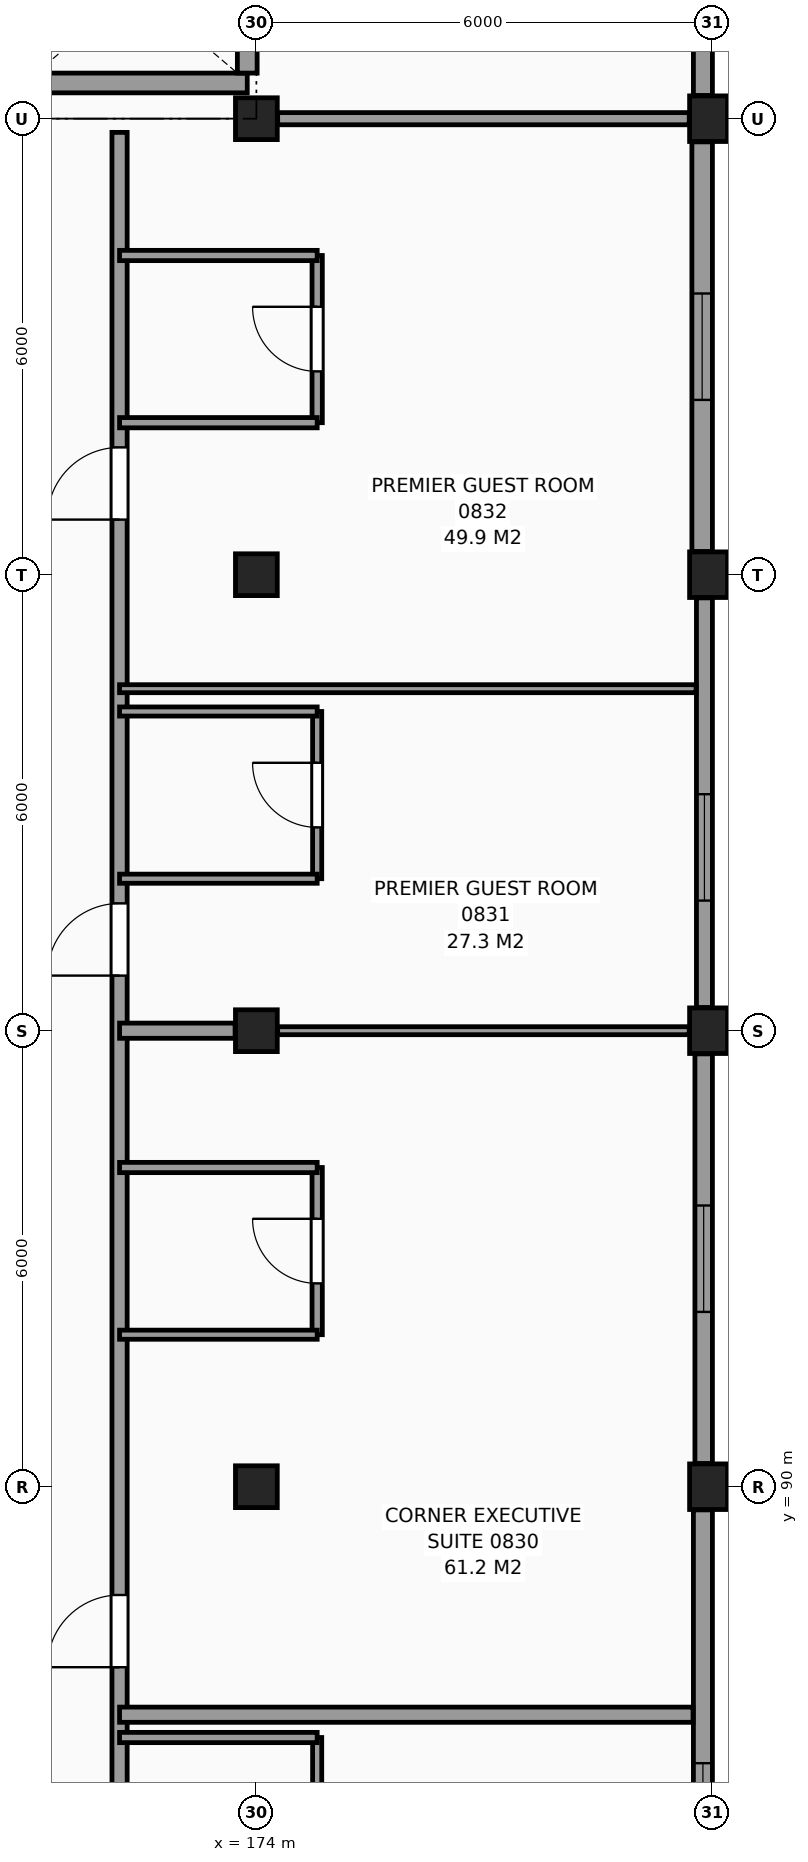
"""IFC4 building model, lengths in metres.
Left out: names, types, materials, properties, quantities, classifications, styles, units other than length and angle.
Written with IfcOpenShell. Run it as: python <this file> out.ifc"""

import sys

from ifc_helpers import new_model, si_unit, direction, frame, frame_2d, origin, origin_2d, place, context, subcontext, project, spatial, rectangle, extrude, element, fill, save


model = new_model("IFC4")
c1 = context("Model", 3, precision=1e-05, world=origin(), true_north=direction((0.0, 1.0)))
c2 = subcontext(c1, "Body", "Model", "MODEL_VIEW")
j1 = project(units=[si_unit("LENGTHUNIT", "METRE"), si_unit("PLANEANGLEUNIT", "RADIAN")], contexts=[c1])
p1 = place(None, origin())
s1 = spatial("IfcSite", under=j1, at=p1, CompositionType="ELEMENT")
p2 = place(p1, origin())
s2 = spatial("IfcBuilding", under=s1, at=p2, CompositionType="ELEMENT")
p3 = place(p2, frame((0.0, 0.0, 34.8)))
s3 = spatial("IfcBuildingStorey", under=s2, at=p3, CompositionType="ELEMENT", Elevation=34.8)
for number, where, z_axis, x_axis in (
    (1, (174.0, 90.0, 0.0), (0.0, 0.0, 1.0), (1.0, 0.0, 0.0)),
    (2, (174.0, 96.0, 0.0), (0.0, 0.0, 1.0), (1.0, 0.0, 0.0)),
    (3, (174.0, 102.0, 0.0), (0.0, 0.0, 1.0), (1.0, 0.0, 0.0)),
    (4, (174.0, 108.0, 0.0), (0.0, 0.0, 1.0), (1.0, 0.0, 0.0)),
):
    element("IfcColumn", number, at=place(p3, frame(where, z_axis=z_axis, x_axis=x_axis)), inside=s3, PredefinedType="COLUMN", context=c2, shape_type="SweptSolid", body=[
        extrude(rectangle(XDim=0.55, YDim=0.55, at=origin_2d()), origin(), (0.0, 0.0, 1.0), 3.3),
    ])
for number, where, z_axis, x_axis in (
    (5, (180.0, 90.0, 0.0), (0.0, 0.0, 1.0), (1.0, 0.0, 0.0)),
    (6, (180.0, 96.0, 0.0), (0.0, 0.0, 1.0), (1.0, 0.0, 0.0)),
    (7, (180.0, 102.0, 0.0), (0.0, 0.0, 1.0), (1.0, 0.0, 0.0)),
    (8, (180.0, 108.0, 0.0), (0.0, 0.0, 1.0), (1.0, 0.0, 0.0)),
):
    element("IfcColumn", number, at=place(p3, frame(where, z_axis=z_axis, x_axis=x_axis)), inside=s3, PredefinedType="COLUMN", context=c2, shape_type="SweptSolid", body=[
        extrude(rectangle(XDim=0.6, YDim=0.6, at=origin_2d()), origin(), (0.0, 0.0, 1.0), 3.3),
    ])
p4 = place(p3, frame((179.875, 84.305, 0.0), z_axis=(0.0, 0.0, 1.0), x_axis=(0.0, 1.0, 0.0)))
e9 = element("IfcWall", 9, at=p4, inside=s3, PredefinedType="SOLIDWALL", context=c2, shape_type="SweptSolid", body=[
    extrude(rectangle(XDim=5.39, YDim=0.25, at=frame_2d((2.695, 0.0))), origin(), (0.0, 0.0, 1.0), 2.42),
])
p5 = place(p4, frame((0.657, 0.0, 0.8)))
e10 = element("IfcOpeningElement", 10, at=p5, cuts=e9, PredefinedType="OPENING", context=c2, shape_type="SweptSolid", body=[
    extrude(rectangle(XDim=1.4, YDim=1.4, at=frame_2d((0.7, 0.7))), frame((0.0, 0.135, 0.0), z_axis=(0.0, -1.0, 0.0), x_axis=(1.0, 0.0, 0.0)), (0.0, 0.0, 1.0), 0.27),
])
p6 = place(p3, frame((179.885, 90.305, 0.0), z_axis=(0.0, 0.0, 1.0), x_axis=(0.0, 1.0, 0.0)))
e11 = element("IfcWall", 11, at=p6, inside=s3, PredefinedType="SOLIDWALL", context=c2, shape_type="SweptSolid", body=[
    extrude(rectangle(XDim=5.39, YDim=0.23, at=frame_2d((2.695, 0.0))), origin(), (0.0, 0.0, 1.0), 2.42),
])
p7 = place(p6, frame((1.995, 0.0, 0.8)))
e12 = element("IfcOpeningElement", 12, at=p7, cuts=e11, PredefinedType="OPENING", context=c2, shape_type="SweptSolid", body=[
    extrude(rectangle(XDim=1.4, YDim=1.4, at=frame_2d((0.7, 0.7))), frame((0.0, 0.125, 0.0), z_axis=(0.0, -1.0, 0.0), x_axis=(1.0, 0.0, 0.0)), (0.0, 0.0, 1.0), 0.25),
])
p8 = place(p3, frame((179.895, 96.305, 0.0), z_axis=(0.0, 0.0, 1.0), x_axis=(0.0, 1.0, 0.0)))
e13 = element("IfcWall", 13, at=p8, inside=s3, PredefinedType="SOLIDWALL", context=c2, shape_type="SweptSolid", body=[
    extrude(rectangle(XDim=5.39, YDim=0.21, at=frame_2d((2.695, 0.0))), origin(), (0.0, 0.0, 1.0), 2.42),
])
p9 = place(p8, frame((1.407, 0.0, 0.8)))
e14 = element("IfcOpeningElement", 14, at=p9, cuts=e13, PredefinedType="OPENING", context=c2, shape_type="SweptSolid", body=[
    extrude(rectangle(XDim=1.4, YDim=1.4, at=frame_2d((0.7, 0.7))), frame((0.0, 0.115, 0.0), z_axis=(0.0, -1.0, 0.0), x_axis=(1.0, 0.0, 0.0)), (0.0, 0.0, 1.0), 0.23),
])
p10 = place(p3, frame((179.865, 102.305, 0.0), z_axis=(0.0, 0.0, 1.0), x_axis=(0.0, 1.0, 0.0)))
e15 = element("IfcWall", 15, at=p10, inside=s3, PredefinedType="SOLIDWALL", context=c2, shape_type="SweptSolid", body=[
    extrude(rectangle(XDim=5.39, YDim=0.27, at=frame_2d((2.695, 0.0))), origin(), (0.0, 0.0, 1.0), 2.42),
])
p11 = place(p10, frame((1.995, 0.0, 0.8)))
e16 = element("IfcOpeningElement", 16, at=p11, cuts=e15, PredefinedType="OPENING", context=c2, shape_type="SweptSolid", body=[
    extrude(rectangle(XDim=1.4, YDim=1.4, at=frame_2d((0.7, 0.7))), frame((0.0, 0.145, 0.0), z_axis=(0.0, -1.0, 0.0), x_axis=(1.0, 0.0, 0.0)), (0.0, 0.0, 1.0), 0.29),
])
p12 = place(p3, frame((179.875, 108.305, 0.0), z_axis=(0.0, 0.0, 1.0), x_axis=(0.0, 1.0, 0.0)))
e17 = element("IfcWall", 17, at=p12, inside=s3, PredefinedType="SOLIDWALL", context=c2, shape_type="SweptSolid", body=[
    extrude(rectangle(XDim=5.39, YDim=0.25, at=frame_2d((2.695, 0.0))), origin(), (0.0, 0.0, 1.0), 2.42),
])
p13 = place(p3, frame((170.97, 108.47, 0.0), z_axis=(0.0, 0.0, 1.0), x_axis=(1.0, 0.0, 0.0)))
e18 = element("IfcWall", 18, at=p13, inside=s3, PredefinedType="SHEAR", context=c2, shape_type="SweptSolid", body=[
    extrude(rectangle(XDim=2.91, YDim=0.26, at=frame_2d((1.455, 0.0))), origin(), (0.0, 0.0, 1.0), 3.3),
])
p14 = place(p3, frame((173.88, 108.6, 0.0), z_axis=(0.0, 0.0, 1.0), x_axis=(0.0, 1.0, 0.0)))
e19 = element("IfcWall", 19, at=p14, inside=s3, PredefinedType="SHEAR", context=c2, shape_type="SweptSolid", body=[
    extrude(rectangle(XDim=2.25, YDim=0.26, at=frame_2d((1.125, 0.0))), origin(), (0.0, 0.0, 1.0), 3.3),
])
p15 = place(p3, frame((172.2, 42.235, 0.0), z_axis=(0.0, 0.0, 1.0), x_axis=(0.0, 1.0, 0.0)))
e20 = element("IfcWall", 20, at=p15, inside=s3, PredefinedType="PARTITIONING", context=c2, shape_type="SweptSolid", body=[
    extrude(rectangle(XDim=65.585, YDim=0.2, at=frame_2d((32.792, 0.0))), origin(), (0.0, 0.0, 1.0), 3.07),
])
p16 = place(p15, frame((7.59, 0.0, 0.0)))
e21 = element("IfcOpeningElement", 21, at=p16, cuts=e20, PredefinedType="OPENING", context=c2, shape_type="SweptSolid", body=[
    extrude(rectangle(XDim=0.95, YDim=2.1, at=frame_2d((0.475, 1.05))), frame((0.0, 0.11, 0.0), z_axis=(0.0, -1.0, 0.0), x_axis=(1.0, 0.0, 0.0)), (0.0, 0.0, 1.0), 0.22),
])
p17 = place(p15, frame((12.09, 0.0, 0.0)))
e22 = element("IfcOpeningElement", 22, at=p17, cuts=e20, PredefinedType="OPENING", context=c2, shape_type="SweptSolid", body=[
    extrude(rectangle(XDim=0.95, YDim=2.1, at=frame_2d((0.475, 1.05))), frame((0.0, 0.11, 0.0), z_axis=(0.0, -1.0, 0.0), x_axis=(1.0, 0.0, 0.0)), (0.0, 0.0, 1.0), 0.22),
])
p18 = place(p15, frame((16.29, 0.0, 0.0)))
e23 = element("IfcOpeningElement", 23, at=p18, cuts=e20, PredefinedType="OPENING", context=c2, shape_type="SweptSolid", body=[
    extrude(rectangle(XDim=0.95, YDim=2.1, at=frame_2d((0.475, 1.05))), frame((0.0, 0.11, 0.0), z_axis=(0.0, -1.0, 0.0), x_axis=(1.0, 0.0, 0.0)), (0.0, 0.0, 1.0), 0.22),
])
p19 = place(p15, frame((18.49, 0.0, 0.0)))
e24 = element("IfcOpeningElement", 24, at=p19, cuts=e20, PredefinedType="OPENING", context=c2, shape_type="SweptSolid", body=[
    extrude(rectangle(XDim=0.95, YDim=2.1, at=frame_2d((0.475, 1.05))), frame((0.0, 0.11, 0.0), z_axis=(0.0, -1.0, 0.0), x_axis=(1.0, 0.0, 0.0)), (0.0, 0.0, 1.0), 0.22),
])
p20 = place(p15, frame((24.49, 0.0, 0.0)))
e25 = element("IfcOpeningElement", 25, at=p20, cuts=e20, PredefinedType="OPENING", context=c2, shape_type="SweptSolid", body=[
    extrude(rectangle(XDim=0.95, YDim=2.1, at=frame_2d((0.475, 1.05))), frame((0.0, 0.11, 0.0), z_axis=(0.0, -1.0, 0.0), x_axis=(1.0, 0.0, 0.0)), (0.0, 0.0, 1.0), 0.22),
])
p21 = place(p15, frame((34.29, 0.0, 0.0)))
e26 = element("IfcOpeningElement", 26, at=p21, cuts=e20, PredefinedType="OPENING", context=c2, shape_type="SweptSolid", body=[
    extrude(rectangle(XDim=0.95, YDim=2.1, at=frame_2d((0.475, 1.05))), frame((0.0, 0.11, 0.0), z_axis=(0.0, -1.0, 0.0), x_axis=(1.0, 0.0, 0.0)), (0.0, 0.0, 1.0), 0.22),
])
p22 = place(p15, frame((36.49, 0.0, 0.0)))
e27 = element("IfcOpeningElement", 27, at=p22, cuts=e20, PredefinedType="OPENING", context=c2, shape_type="SweptSolid", body=[
    extrude(rectangle(XDim=0.95, YDim=2.1, at=frame_2d((0.475, 1.05))), frame((0.0, 0.11, 0.0), z_axis=(0.0, -1.0, 0.0), x_axis=(1.0, 0.0, 0.0)), (0.0, 0.0, 1.0), 0.22),
])
p23 = place(p15, frame((40.89, 0.0, 0.0)))
e28 = element("IfcOpeningElement", 28, at=p23, cuts=e20, PredefinedType="OPENING", context=c2, shape_type="SweptSolid", body=[
    extrude(rectangle(XDim=0.95, YDim=2.1, at=frame_2d((0.475, 1.05))), frame((0.0, 0.11, 0.0), z_axis=(0.0, -1.0, 0.0), x_axis=(1.0, 0.0, 0.0)), (0.0, 0.0, 1.0), 0.22),
])
p24 = place(p15, frame((45.39, 0.0, 0.0)))
e29 = element("IfcOpeningElement", 29, at=p24, cuts=e20, PredefinedType="OPENING", context=c2, shape_type="SweptSolid", body=[
    extrude(rectangle(XDim=0.95, YDim=2.1, at=frame_2d((0.475, 1.05))), frame((0.0, 0.11, 0.0), z_axis=(0.0, -1.0, 0.0), x_axis=(1.0, 0.0, 0.0)), (0.0, 0.0, 1.0), 0.22),
])
p25 = place(p15, frame((54.49, 0.0, 0.0)))
e30 = element("IfcOpeningElement", 30, at=p25, cuts=e20, PredefinedType="OPENING", context=c2, shape_type="SweptSolid", body=[
    extrude(rectangle(XDim=0.95, YDim=2.1, at=frame_2d((0.475, 1.05))), frame((0.0, 0.11, 0.0), z_axis=(0.0, -1.0, 0.0), x_axis=(1.0, 0.0, 0.0)), (0.0, 0.0, 1.0), 0.22),
])
p26 = place(p15, frame((60.49, 0.0, 0.0)))
e31 = element("IfcOpeningElement", 31, at=p26, cuts=e20, PredefinedType="OPENING", context=c2, shape_type="SweptSolid", body=[
    extrude(rectangle(XDim=0.95, YDim=2.1, at=frame_2d((0.475, 1.05))), frame((0.0, 0.11, 0.0), z_axis=(0.0, -1.0, 0.0), x_axis=(1.0, 0.0, 0.0)), (0.0, 0.0, 1.0), 0.22),
])
p27 = place(p3, frame((174.8, 84.5, 0.0), z_axis=(0.0, 0.0, 1.0), x_axis=(0.0, 1.0, 0.0)))
e32 = element("IfcWall", 32, at=p27, inside=s3, PredefinedType="PARTITIONING", context=c2, shape_type="SweptSolid", body=[
    extrude(rectangle(XDim=2.2, YDim=0.12, at=frame_2d((1.1, 0.0))), origin(), (0.0, 0.0, 1.0), 3.07),
])
p28 = place(p27, frame((0.675, 0.0, 0.0)))
e33 = element("IfcOpeningElement", 33, at=p28, cuts=e32, PredefinedType="OPENING", context=c2, shape_type="SweptSolid", body=[
    extrude(rectangle(XDim=0.85, YDim=2.1, at=frame_2d((0.425, 1.05))), frame((0.0, 0.07, 0.0), z_axis=(0.0, -1.0, 0.0), x_axis=(1.0, 0.0, 0.0)), (0.0, 0.0, 1.0), 0.14),
])
p29 = place(p3, frame((174.8, 92.0, 0.0), z_axis=(0.0, 0.0, 1.0), x_axis=(0.0, 1.0, 0.0)))
e34 = element("IfcWall", 34, at=p29, inside=s3, PredefinedType="PARTITIONING", context=c2, shape_type="SweptSolid", body=[
    extrude(rectangle(XDim=2.2, YDim=0.135, at=frame_2d((1.1, 0.0))), origin(), (0.0, 0.0, 1.0), 3.07),
])
p30 = place(p29, frame((0.675, 0.0, 0.0)))
e35 = element("IfcOpeningElement", 35, at=p30, cuts=e34, PredefinedType="OPENING", context=c2, shape_type="SweptSolid", body=[
    extrude(rectangle(XDim=0.85, YDim=2.1, at=frame_2d((0.425, 1.05))), frame((0.0, 0.078, 0.0), z_axis=(0.0, -1.0, 0.0), x_axis=(1.0, 0.0, 0.0)), (0.0, 0.0, 1.0), 0.155),
])
p31 = place(p3, frame((174.8, 98.0, 0.0), z_axis=(0.0, 0.0, 1.0), x_axis=(0.0, 1.0, 0.0)))
e36 = element("IfcWall", 36, at=p31, inside=s3, PredefinedType="PARTITIONING", context=c2, shape_type="SweptSolid", body=[
    extrude(rectangle(XDim=2.2, YDim=0.12, at=frame_2d((1.1, 0.0))), origin(), (0.0, 0.0, 1.0), 3.07),
])
p32 = place(p31, frame((0.675, 0.0, 0.0)))
e37 = element("IfcOpeningElement", 37, at=p32, cuts=e36, PredefinedType="OPENING", context=c2, shape_type="SweptSolid", body=[
    extrude(rectangle(XDim=0.85, YDim=2.1, at=frame_2d((0.425, 1.05))), frame((0.0, 0.07, 0.0), z_axis=(0.0, -1.0, 0.0), x_axis=(1.0, 0.0, 0.0)), (0.0, 0.0, 1.0), 0.14),
])
p33 = place(p3, frame((174.8, 104.0, 0.0), z_axis=(0.0, 0.0, 1.0), x_axis=(0.0, 1.0, 0.0)))
e38 = element("IfcWall", 38, at=p33, inside=s3, PredefinedType="PARTITIONING", context=c2, shape_type="SweptSolid", body=[
    extrude(rectangle(XDim=2.2, YDim=0.135, at=frame_2d((1.1, 0.0))), origin(), (0.0, 0.0, 1.0), 3.07),
])
p34 = place(p33, frame((0.675, 0.0, 0.0)))
e39 = element("IfcOpeningElement", 39, at=p34, cuts=e38, PredefinedType="OPENING", context=c2, shape_type="SweptSolid", body=[
    extrude(rectangle(XDim=0.85, YDim=2.1, at=frame_2d((0.425, 1.05))), frame((0.0, 0.078, 0.0), z_axis=(0.0, -1.0, 0.0), x_axis=(1.0, 0.0, 0.0)), (0.0, 0.0, 1.0), 0.155),
])
p35 = place(p3, frame((172.2, 86.7, 0.0), z_axis=(0.0, 0.0, 1.0), x_axis=(1.0, 0.0, 0.0)))
e40 = element("IfcWall", 40, at=p35, inside=s3, PredefinedType="PARTITIONING", context=c2, shape_type="SweptSolid", body=[
    extrude(rectangle(XDim=2.6, YDim=0.135, at=frame_2d((1.3, 0.0))), origin(), (0.0, 0.0, 1.0), 3.07),
])
p36 = place(p3, frame((172.2, 87.0, 0.0), z_axis=(0.0, 0.0, 1.0), x_axis=(1.0, 0.0, 0.0)))
e41 = element("IfcWall", 41, at=p36, inside=s3, PredefinedType="PARTITIONING", context=c2, shape_type="SweptSolid", body=[
    extrude(rectangle(XDim=7.545, YDim=0.2, at=frame_2d((3.772, 0.0))), origin(), (0.0, 0.0, 1.0), 3.07),
])
p37 = place(p3, frame((172.2, 92.0, 0.0), z_axis=(0.0, 0.0, 1.0), x_axis=(1.0, 0.0, 0.0)))
e42 = element("IfcWall", 42, at=p37, inside=s3, PredefinedType="PARTITIONING", context=c2, shape_type="SweptSolid", body=[
    extrude(rectangle(XDim=2.6, YDim=0.12, at=frame_2d((1.3, 0.0))), origin(), (0.0, 0.0, 1.0), 3.07),
])
p38 = place(p3, frame((172.2, 94.2, 0.0), z_axis=(0.0, 0.0, 1.0), x_axis=(1.0, 0.0, 0.0)))
e43 = element("IfcWall", 43, at=p38, inside=s3, PredefinedType="PARTITIONING", context=c2, shape_type="SweptSolid", body=[
    extrude(rectangle(XDim=2.6, YDim=0.135, at=frame_2d((1.3, 0.0))), origin(), (0.0, 0.0, 1.0), 3.07),
])
p39 = place(p3, frame((172.2, 96.0, 0.0), z_axis=(0.0, 0.0, 1.0), x_axis=(1.0, 0.0, 0.0)))
e44 = element("IfcWall", 44, at=p39, inside=s3, PredefinedType="PARTITIONING", context=c2, shape_type="SweptSolid", body=[
    extrude(rectangle(XDim=1.52, YDim=0.2, at=frame_2d((0.76, 0.0))), origin(), (0.0, 0.0, 1.0), 2.47),
])
p40 = place(p3, frame((174.28, 96.0, 0.0), z_axis=(0.0, 0.0, 1.0), x_axis=(1.0, 0.0, 0.0)))
e45 = element("IfcWall", 45, at=p40, inside=s3, PredefinedType="PARTITIONING", context=c2, shape_type="SweptSolid", body=[
    extrude(rectangle(XDim=5.415, YDim=0.105, at=frame_2d((2.708, 0.0))), origin(), (0.0, 0.0, 1.0), 2.62),
])
for number, where, z_axis, x_axis in (
    (46, (172.2, 98.0, 0.0), (0.0, 0.0, 1.0), (1.0, 0.0, 0.0)),
    (47, (172.2, 100.2, 0.0), (0.0, 0.0, 1.0), (1.0, 0.0, 0.0)),
):
    element("IfcWall", number, at=place(p3, frame(where, z_axis=z_axis, x_axis=x_axis)), inside=s3, PredefinedType="PARTITIONING", context=c2, shape_type="SweptSolid", body=[
        extrude(rectangle(XDim=2.6, YDim=0.12, at=frame_2d((1.3, 0.0))), origin(), (0.0, 0.0, 1.0), 3.07),
    ])
p41 = place(p3, frame((172.2, 100.5, 0.0), z_axis=(0.0, 0.0, 1.0), x_axis=(1.0, 0.0, 0.0)))
e48 = element("IfcWall", 48, at=p41, inside=s3, PredefinedType="PARTITIONING", context=c2, shape_type="SweptSolid", body=[
    extrude(rectangle(XDim=7.585, YDim=0.105, at=frame_2d((3.792, 0.0))), origin(), (0.0, 0.0, 1.0), 3.07),
])
for number, where, z_axis, x_axis in (
    (49, (172.2, 104.0, 0.0), (0.0, 0.0, 1.0), (1.0, 0.0, 0.0)),
    (50, (172.2, 106.2, 0.0), (0.0, 0.0, 1.0), (1.0, 0.0, 0.0)),
):
    element("IfcWall", number, at=place(p3, frame(where, z_axis=z_axis, x_axis=x_axis)), inside=s3, PredefinedType="PARTITIONING", context=c2, shape_type="SweptSolid", body=[
        extrude(rectangle(XDim=2.6, YDim=0.135, at=frame_2d((1.3, 0.0))), origin(), (0.0, 0.0, 1.0), 3.07),
    ])
p42 = place(p3, frame((174.28, 108.0, 0.0), z_axis=(0.0, 0.0, 1.0), x_axis=(1.0, 0.0, 0.0)))
e51 = element("IfcWall", 51, at=p42, inside=s3, PredefinedType="PARTITIONING", context=c2, shape_type="SweptSolid", body=[
    extrude(rectangle(XDim=5.415, YDim=0.16, at=frame_2d((2.708, 0.0))), origin(), (0.0, 0.0, 1.0), 2.62),
])
p43 = place(p5, origin())
e52 = element("IfcWindow", 52, at=p43, inside=s3, PartitioningType="SINGLE_PANEL", PredefinedType="WINDOW", context=c2, shape_type="SweptSolid", body=[
    extrude(rectangle(XDim=1.4, YDim=1.4, at=frame_2d((0.7, 0.7))), frame((0.0, 0.03, 0.0), z_axis=(0.0, -1.0, 0.0), x_axis=(1.0, 0.0, 0.0)), (0.0, 0.0, 1.0), 0.06),
])
fill(e10, e52)
p44 = place(p7, origin())
e53 = element("IfcWindow", 53, at=p44, inside=s3, PartitioningType="SINGLE_PANEL", PredefinedType="WINDOW", context=c2, shape_type="SweptSolid", body=[
    extrude(rectangle(XDim=1.4, YDim=1.4, at=frame_2d((0.7, 0.7))), frame((0.0, 0.03, 0.0), z_axis=(0.0, -1.0, 0.0), x_axis=(1.0, 0.0, 0.0)), (0.0, 0.0, 1.0), 0.06),
])
fill(e12, e53)
p45 = place(p9, origin())
e54 = element("IfcWindow", 54, at=p45, inside=s3, PartitioningType="SINGLE_PANEL", PredefinedType="WINDOW", context=c2, shape_type="SweptSolid", body=[
    extrude(rectangle(XDim=1.4, YDim=1.4, at=frame_2d((0.7, 0.7))), frame((0.0, 0.03, 0.0), z_axis=(0.0, -1.0, 0.0), x_axis=(1.0, 0.0, 0.0)), (0.0, 0.0, 1.0), 0.06),
])
fill(e14, e54)
p46 = place(p11, origin())
e55 = element("IfcWindow", 55, at=p46, inside=s3, PartitioningType="SINGLE_PANEL", PredefinedType="WINDOW", context=c2, shape_type="SweptSolid", body=[
    extrude(rectangle(XDim=1.4, YDim=1.4, at=frame_2d((0.7, 0.7))), frame((0.0, 0.03, 0.0), z_axis=(0.0, -1.0, 0.0), x_axis=(1.0, 0.0, 0.0)), (0.0, 0.0, 1.0), 0.06),
])
fill(e16, e55)
p47 = place(p30, origin())
e56 = element("IfcDoor", 56, at=p47, inside=s3, OperationType="SINGLE_SWING_RIGHT", PredefinedType="DOOR", context=c2, shape_type="SweptSolid", body=[
    extrude(rectangle(XDim=0.85, YDim=2.1, at=frame_2d((0.425, 1.05))), frame((0.0, 0.025, 0.0), z_axis=(0.0, -1.0, 0.0), x_axis=(1.0, 0.0, 0.0)), (0.0, 0.0, 1.0), 0.05),
])
fill(e35, e56)
p48 = place(p24, origin())
e57 = element("IfcDoor", 57, at=p48, inside=s3, OperationType="SINGLE_SWING_LEFT", PredefinedType="DOOR", context=c2, shape_type="SweptSolid", body=[
    extrude(rectangle(XDim=0.95, YDim=2.1, at=frame_2d((0.475, 1.05))), frame((0.0, 0.025, 0.0), z_axis=(0.0, -1.0, 0.0), x_axis=(1.0, 0.0, 0.0)), (0.0, 0.0, 1.0), 0.05),
])
fill(e29, e57)
p49 = place(p32, origin())
e58 = element("IfcDoor", 58, at=p49, inside=s3, OperationType="SINGLE_SWING_RIGHT", PredefinedType="DOOR", context=c2, shape_type="SweptSolid", body=[
    extrude(rectangle(XDim=0.85, YDim=2.1, at=frame_2d((0.425, 1.05))), frame((0.0, 0.025, 0.0), z_axis=(0.0, -1.0, 0.0), x_axis=(1.0, 0.0, 0.0)), (0.0, 0.0, 1.0), 0.05),
])
fill(e37, e58)
p50 = place(p25, origin())
e59 = element("IfcDoor", 59, at=p50, inside=s3, OperationType="SINGLE_SWING_LEFT", PredefinedType="DOOR", context=c2, shape_type="SweptSolid", body=[
    extrude(rectangle(XDim=0.95, YDim=2.1, at=frame_2d((0.475, 1.05))), frame((0.0, 0.025, 0.0), z_axis=(0.0, -1.0, 0.0), x_axis=(1.0, 0.0, 0.0)), (0.0, 0.0, 1.0), 0.05),
])
fill(e30, e59)
p51 = place(p34, origin())
e60 = element("IfcDoor", 60, at=p51, inside=s3, OperationType="SINGLE_SWING_RIGHT", PredefinedType="DOOR", context=c2, shape_type="SweptSolid", body=[
    extrude(rectangle(XDim=0.85, YDim=2.1, at=frame_2d((0.425, 1.05))), frame((0.0, 0.025, 0.0), z_axis=(0.0, -1.0, 0.0), x_axis=(1.0, 0.0, 0.0)), (0.0, 0.0, 1.0), 0.05),
])
fill(e39, e60)
p52 = place(p26, origin())
e61 = element("IfcDoor", 61, at=p52, inside=s3, OperationType="SINGLE_SWING_LEFT", PredefinedType="DOOR", context=c2, shape_type="SweptSolid", body=[
    extrude(rectangle(XDim=0.95, YDim=2.1, at=frame_2d((0.475, 1.05))), frame((0.0, 0.025, 0.0), z_axis=(0.0, -1.0, 0.0), x_axis=(1.0, 0.0, 0.0)), (0.0, 0.0, 1.0), 0.05),
])
fill(e31, e61)
save(model, sys.argv[1])
